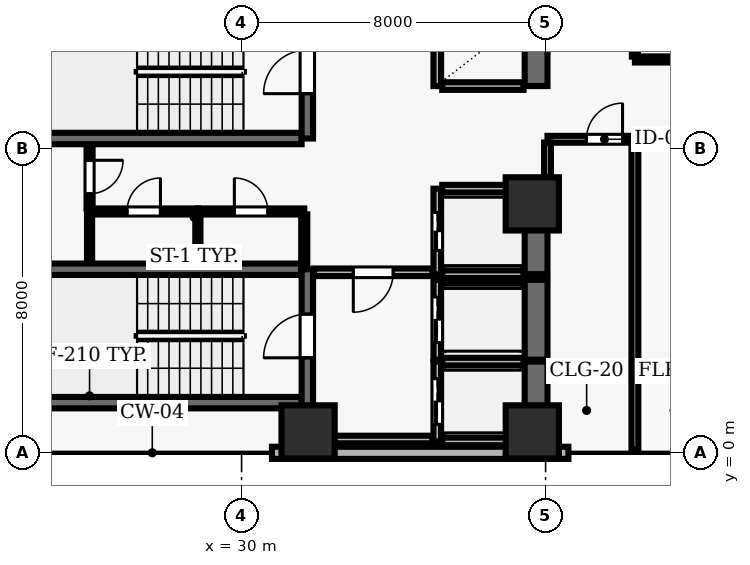
"""IFC4 building model, lengths in metres.
Left out: names, types, materials, properties, quantities, classifications, styles, units other than length and angle.
Written with IfcOpenShell. Run it as: python <this file> out.ifc"""

import sys

from ifc_helpers import new_model, si_unit, direction, frame, frame_2d, origin, origin_2d, place, context, subcontext, project, spatial, rectangle, extrude, element, fill, save


model = new_model("IFC4")
c1 = context("Model", 3, precision=1e-05, world=origin(), true_north=direction((0.0, 1.0)))
c2 = subcontext(c1, "Body", "Model", "MODEL_VIEW")
j1 = project(units=[si_unit("LENGTHUNIT", "METRE"), si_unit("PLANEANGLEUNIT", "RADIAN")], contexts=[c1])
p1 = place(None, origin())
s1 = spatial("IfcSite", under=j1, at=p1, CompositionType="ELEMENT")
p2 = place(p1, origin())
s2 = spatial("IfcBuilding", under=s1, at=p2, CompositionType="ELEMENT")
p3 = place(p2, frame((0.0, 0.0, 54.4)))
s3 = spatial("IfcBuildingStorey", under=s2, at=p3, CompositionType="ELEMENT", Elevation=54.4)
for number, where, z_axis, x_axis in (
    (1, (31.75, 0.55, 0.0), (0.0, 0.0, 1.0), (1.0, 0.0, 0.0)),
    (2, (37.65, 0.55, 0.0), (0.0, 0.0, 1.0), (1.0, 0.0, 0.0)),
    (3, (37.65, 6.55, 0.0), (0.0, 0.0, 1.0), (1.0, 0.0, 0.0)),
):
    element("IfcColumn", number, at=place(p3, frame(where, z_axis=z_axis, x_axis=x_axis)), inside=s3, PredefinedType="COLUMN", context=c2, shape_type="SweptSolid", body=[
        extrude(rectangle(XDim=1.4, YDim=1.4, at=origin_2d()), origin(), (0.0, 0.0, 1.0), 3.9),
    ])
p4 = place(p3, frame((30.8, 0.0, 0.0), z_axis=(0.0, 0.0, 1.0), x_axis=(1.0, 0.0, 0.0)))
e4 = element("IfcWall", 4, at=p4, inside=s3, PredefinedType="SOLIDWALL", context=c2, shape_type="SweptSolid", body=[
    extrude(rectangle(XDim=7.8, YDim=0.32, at=frame_2d((3.9, 0.0))), origin(), (0.0, 0.0, 1.0), 3.69),
])
for number, where, z_axis, x_axis in (
    (5, (31.58, 4.83, 0.0), (0.0, 0.0, 1.0), (-1.0, 0.0, 0.0)),
    (6, (23.22, 1.32, 0.0), (0.0, 0.0, 1.0), (1.0, 0.0, 0.0)),
):
    element("IfcWall", number, at=place(p3, frame(where, z_axis=z_axis, x_axis=x_axis)), inside=s3, PredefinedType="SHEAR", context=c2, shape_type="SweptSolid", body=[
        extrude(rectangle(XDim=8.36, YDim=0.3, at=frame_2d((4.18, 0.0))), origin(), (0.0, 0.0, 1.0), 3.69),
    ])
p5 = place(p3, frame((31.73, 0.96, 0.0), z_axis=(0.0, 0.0, 1.0), x_axis=(0.0, 1.0, 0.0)))
e7 = element("IfcWall", 7, at=p5, inside=s3, PredefinedType="SHEAR", context=c2, shape_type="SweptSolid", body=[
    extrude(rectangle(XDim=3.87, YDim=0.3, at=frame_2d((1.935, 0.0))), origin(), (0.0, 0.0, 1.0), 3.69),
])
p6 = place(p5, frame((1.54, 0.0, 0.0)))
e8 = element("IfcOpeningElement", 8, at=p6, cuts=e7, PredefinedType="OPENING", context=c2, shape_type="SweptSolid", body=[
    extrude(rectangle(XDim=1.15, YDim=2.15, at=frame_2d((0.575, 1.075))), frame((0.0, 0.16, 0.0), z_axis=(0.0, -1.0, 0.0), x_axis=(1.0, 0.0, 0.0)), (0.0, 0.0, 1.0), 0.32),
])
p7 = place(p3, frame((23.22, 8.27, 0.0), z_axis=(0.0, 0.0, 1.0), x_axis=(1.0, 0.0, 0.0)))
e9 = element("IfcWall", 9, at=p7, inside=s3, PredefinedType="SHEAR", context=c2, shape_type="SweptSolid", body=[
    extrude(rectangle(XDim=8.36, YDim=0.3, at=frame_2d((4.18, 0.0))), origin(), (0.0, 0.0, 1.0), 3.69),
])
p8 = place(p3, frame((31.73, 8.27, 0.0), z_axis=(0.0, 0.0, 1.0), x_axis=(0.0, 1.0, 0.0)))
e10 = element("IfcWall", 10, at=p8, inside=s3, PredefinedType="SHEAR", context=c2, shape_type="SweptSolid", body=[
    extrude(rectangle(XDim=3.51, YDim=0.3, at=frame_2d((1.755, 0.0))), origin(), (0.0, 0.0, 1.0), 3.69),
])
p9 = place(p8, frame((1.18, 0.0, 0.0)))
e11 = element("IfcOpeningElement", 11, at=p9, cuts=e10, PredefinedType="OPENING", context=c2, shape_type="SweptSolid", body=[
    extrude(rectangle(XDim=1.15, YDim=2.15, at=frame_2d((0.575, 1.075))), frame((0.0, 0.16, 0.0), z_axis=(0.0, -1.0, 0.0), x_axis=(1.0, 0.0, 0.0)), (0.0, 0.0, 1.0), 0.32),
])
p10 = place(p3, frame((35.15, 2.4, 0.0), z_axis=(0.0, 0.0, 1.0), x_axis=(0.0, -1.0, 0.0)))
e12 = element("IfcWall", 12, at=p10, inside=s3, PredefinedType="SOLIDWALL", context=c2, shape_type="SweptSolid", body=[
    extrude(rectangle(XDim=2.1, YDim=0.2, at=frame_2d((1.05, 0.0))), origin(), (0.0, 0.0, 1.0), 3.69),
])
p11 = place(p10, frame((0.45, 0.0, 0.0)))
e13 = element("IfcOpeningElement", 13, at=p11, cuts=e12, PredefinedType="OPENING", context=c2, shape_type="SweptSolid", body=[
    extrude(rectangle(XDim=1.2, YDim=2.15, at=frame_2d((0.6, 1.075))), frame((0.0, 0.11, 0.0), z_axis=(0.0, -1.0, 0.0), x_axis=(1.0, 0.0, 0.0)), (0.0, 0.0, 1.0), 0.22),
])
p12 = place(p3, frame((37.75, 0.3, 0.0), z_axis=(0.0, 0.0, 1.0), x_axis=(0.0, 1.0, 0.0)))
e14 = element("IfcWall", 14, at=p12, inside=s3, PredefinedType="SHEAR", context=c2, shape_type="SweptSolid", body=[
    extrude(rectangle(XDim=2.1, YDim=0.6, at=frame_2d((1.05, 0.0))), origin(), (0.0, 0.0, 1.0), 3.69),
])
for number, where, z_axis, x_axis in (
    (15, (35.28, 0.3, 0.0), (0.0, 0.0, 1.0), (1.0, 0.0, 0.0)),
    (16, (37.42, 2.4, 0.0), (0.0, 0.0, 1.0), (-1.0, 0.0, 0.0)),
):
    element("IfcWall", number, at=place(p3, frame(where, z_axis=z_axis, x_axis=x_axis)), inside=s3, PredefinedType="SOLIDWALL", context=c2, shape_type="SweptSolid", body=[
        extrude(rectangle(XDim=2.14, YDim=0.2, at=frame_2d((1.07, 0.0))), origin(), (0.0, 0.0, 1.0), 3.69),
    ])
p13 = place(p3, frame((35.15, 4.55, 0.0), z_axis=(0.0, 0.0, 1.0), x_axis=(0.0, -1.0, 0.0)))
e17 = element("IfcWall", 17, at=p13, inside=s3, PredefinedType="SOLIDWALL", context=c2, shape_type="SweptSolid", body=[
    extrude(rectangle(XDim=2.1, YDim=0.2, at=frame_2d((1.05, 0.0))), origin(), (0.0, 0.0, 1.0), 3.69),
])
p14 = place(p13, frame((0.45, 0.0, 0.0)))
e18 = element("IfcOpeningElement", 18, at=p14, cuts=e17, PredefinedType="OPENING", context=c2, shape_type="SweptSolid", body=[
    extrude(rectangle(XDim=1.2, YDim=2.15, at=frame_2d((0.6, 1.075))), frame((0.0, 0.11, 0.0), z_axis=(0.0, -1.0, 0.0), x_axis=(1.0, 0.0, 0.0)), (0.0, 0.0, 1.0), 0.22),
])
p15 = place(p3, frame((37.75, 2.45, 0.0), z_axis=(0.0, 0.0, 1.0), x_axis=(0.0, 1.0, 0.0)))
e19 = element("IfcWall", 19, at=p15, inside=s3, PredefinedType="SHEAR", context=c2, shape_type="SweptSolid", body=[
    extrude(rectangle(XDim=2.1, YDim=0.6, at=frame_2d((1.05, 0.0))), origin(), (0.0, 0.0, 1.0), 3.69),
])
p16 = place(p3, frame((37.42, 4.55, 0.0), z_axis=(0.0, 0.0, 1.0), x_axis=(-1.0, 0.0, 0.0)))
e20 = element("IfcWall", 20, at=p16, inside=s3, PredefinedType="SOLIDWALL", context=c2, shape_type="SweptSolid", body=[
    extrude(rectangle(XDim=2.14, YDim=0.2, at=frame_2d((1.07, 0.0))), origin(), (0.0, 0.0, 1.0), 3.69),
])
p17 = place(p3, frame((35.15, 6.95, 0.0), z_axis=(0.0, 0.0, 1.0), x_axis=(0.0, -1.0, 0.0)))
e21 = element("IfcWall", 21, at=p17, inside=s3, PredefinedType="SOLIDWALL", context=c2, shape_type="SweptSolid", body=[
    extrude(rectangle(XDim=2.25, YDim=0.2, at=frame_2d((1.125, 0.0))), origin(), (0.0, 0.0, 1.0), 3.69),
])
p18 = place(p17, frame((0.625, 0.0, 0.0)))
e22 = element("IfcOpeningElement", 22, at=p18, cuts=e21, PredefinedType="OPENING", context=c2, shape_type="SweptSolid", body=[
    extrude(rectangle(XDim=1.0, YDim=2.1, at=frame_2d((0.5, 1.05))), frame((0.0, 0.11, 0.0), z_axis=(0.0, -1.0, 0.0), x_axis=(1.0, 0.0, 0.0)), (0.0, 0.0, 1.0), 0.22),
])
p19 = place(p3, frame((37.75, 4.7, 0.0), z_axis=(0.0, 0.0, 1.0), x_axis=(0.0, 1.0, 0.0)))
e23 = element("IfcWall", 23, at=p19, inside=s3, PredefinedType="SHEAR", context=c2, shape_type="SweptSolid", body=[
    extrude(rectangle(XDim=2.25, YDim=0.6, at=frame_2d((1.125, 0.0))), origin(), (0.0, 0.0, 1.0), 3.69),
])
for number, where, z_axis, x_axis in (
    (24, (35.28, 4.7, 0.0), (0.0, 0.0, 1.0), (1.0, 0.0, 0.0)),
    (25, (37.42, 6.95, 0.0), (0.0, 0.0, 1.0), (-1.0, 0.0, 0.0)),
):
    element("IfcWall", number, at=place(p3, frame(where, z_axis=z_axis, x_axis=x_axis)), inside=s3, PredefinedType="SOLIDWALL", context=c2, shape_type="SweptSolid", body=[
        extrude(rectangle(XDim=2.14, YDim=0.2, at=frame_2d((1.07, 0.0))), origin(), (0.0, 0.0, 1.0), 3.69),
    ])
p20 = place(p3, frame((35.15, 11.55, 0.0), z_axis=(0.0, 0.0, 1.0), x_axis=(0.0, -1.0, 0.0)))
e26 = element("IfcWall", 26, at=p20, inside=s3, PredefinedType="SOLIDWALL", context=c2, shape_type="SweptSolid", body=[
    extrude(rectangle(XDim=1.9, YDim=0.2, at=frame_2d((0.95, 0.0))), origin(), (0.0, 0.0, 1.0), 3.69),
])
p21 = place(p3, frame((37.75, 9.65, 0.0), z_axis=(0.0, 0.0, 1.0), x_axis=(0.0, 1.0, 0.0)))
e27 = element("IfcWall", 27, at=p21, inside=s3, PredefinedType="SHEAR", context=c2, shape_type="SweptSolid", body=[
    extrude(rectangle(XDim=1.9, YDim=0.6, at=frame_2d((0.95, 0.0))), origin(), (0.0, 0.0, 1.0), 3.69),
])
p22 = place(p3, frame((35.28, 9.65, 0.0), z_axis=(0.0, 0.0, 1.0), x_axis=(1.0, 0.0, 0.0)))
e28 = element("IfcWall", 28, at=p22, inside=s3, PredefinedType="SOLIDWALL", context=c2, shape_type="SweptSolid", body=[
    extrude(rectangle(XDim=2.14, YDim=0.2, at=frame_2d((1.07, 0.0))), origin(), (0.0, 0.0, 1.0), 3.69),
])
p23 = place(p3, frame((26.0, 6.35, 0.0), z_axis=(0.0, 0.0, 1.0), x_axis=(1.0, 0.0, 0.0)))
e29 = element("IfcWall", 29, at=p23, inside=s3, PredefinedType="PARTITIONING", context=c2, shape_type="SweptSolid", body=[
    extrude(rectangle(XDim=2.85, YDim=0.16, at=frame_2d((1.425, 0.0))), origin(), (0.0, 0.0, 1.0), 3.69),
])
p24 = place(p23, frame((0.985, 0.0, 0.0)))
e30 = element("IfcOpeningElement", 30, at=p24, cuts=e29, PredefinedType="OPENING", context=c2, shape_type="SweptSolid", body=[
    extrude(rectangle(XDim=0.88, YDim=2.1, at=frame_2d((0.44, 1.05))), frame((0.0, 0.09, 0.0), z_axis=(0.0, -1.0, 0.0), x_axis=(1.0, 0.0, 0.0)), (0.0, 0.0, 1.0), 0.18),
])
p25 = place(p3, frame((28.85, 6.35, 0.0), z_axis=(0.0, 0.0, 1.0), x_axis=(1.0, 0.0, 0.0)))
e31 = element("IfcWall", 31, at=p25, inside=s3, PredefinedType="PARTITIONING", context=c2, shape_type="SweptSolid", body=[
    extrude(rectangle(XDim=2.8, YDim=0.16, at=frame_2d((1.4, 0.0))), origin(), (0.0, 0.0, 1.0), 3.69),
])
p26 = place(p25, frame((0.96, 0.0, 0.0)))
e32 = element("IfcOpeningElement", 32, at=p26, cuts=e31, PredefinedType="OPENING", context=c2, shape_type="SweptSolid", body=[
    extrude(rectangle(XDim=0.88, YDim=2.1, at=frame_2d((0.44, 1.05))), frame((0.0, 0.09, 0.0), z_axis=(0.0, -1.0, 0.0), x_axis=(1.0, 0.0, 0.0)), (0.0, 0.0, 1.0), 0.18),
])
p27 = place(p3, frame((31.65, 0.35, 0.0), z_axis=(0.0, 0.0, 1.0), x_axis=(1.0, 0.0, 0.0)))
e33 = element("IfcWall", 33, at=p27, inside=s3, PredefinedType="SOLIDWALL", context=c2, shape_type="SweptSolid", body=[
    extrude(rectangle(XDim=3.37, YDim=0.2, at=frame_2d((1.685, 0.0))), origin(), (0.0, 0.0, 1.0), 3.69),
])
p28 = place(p3, frame((35.02, 4.75, 0.0), z_axis=(0.0, 0.0, 1.0), x_axis=(-1.0, 0.0, 0.0)))
e34 = element("IfcWall", 34, at=p28, inside=s3, PredefinedType="SOLIDWALL", context=c2, shape_type="SweptSolid", body=[
    extrude(rectangle(XDim=3.11, YDim=0.2, at=frame_2d((1.555, 0.0))), origin(), (0.0, 0.0, 1.0), 3.69),
])
p29 = place(p28, frame((1.03, 0.0, 0.0)))
e35 = element("IfcOpeningElement", 35, at=p29, cuts=e34, PredefinedType="OPENING", context=c2, shape_type="SweptSolid", body=[
    extrude(rectangle(XDim=1.05, YDim=2.15, at=frame_2d((0.525, 1.075))), frame((0.0, 0.11, 0.0), z_axis=(0.0, -1.0, 0.0), x_axis=(1.0, 0.0, 0.0)), (0.0, 0.0, 1.0), 0.22),
])
p30 = place(p3, frame((38.05, 8.25, 0.0), z_axis=(0.0, 0.0, 1.0), x_axis=(1.0, 0.0, 0.0)))
e36 = element("IfcWall", 36, at=p30, inside=s3, PredefinedType="PARTITIONING", context=c2, shape_type="SweptSolid", body=[
    extrude(rectangle(XDim=2.3, YDim=0.18, at=frame_2d((1.15, 0.0))), origin(), (0.0, 0.0, 1.0), 2.995),
])
p31 = place(p30, frame((1.025, 0.0, 0.0)))
e37 = element("IfcOpeningElement", 37, at=p31, cuts=e36, PredefinedType="OPENING", context=c2, shape_type="SweptSolid", body=[
    extrude(rectangle(XDim=0.95, YDim=2.1, at=frame_2d((0.475, 1.05))), frame((0.0, 0.1, 0.0), z_axis=(0.0, -1.0, 0.0), x_axis=(1.0, 0.0, 0.0)), (0.0, 0.0, 1.0), 0.2),
])
p32 = place(p3, frame((40.35, 8.25, 0.0), z_axis=(0.0, 0.0, 1.0), x_axis=(1.0, 0.0, 0.0)))
e38 = element("IfcWall", 38, at=p32, inside=s3, PredefinedType="PARTITIONING", context=c2, shape_type="SweptSolid", body=[
    extrude(rectangle(XDim=8.91, YDim=0.16, at=frame_2d((4.455, 0.0))), origin(), (0.0, 0.0, 1.0), 2.995),
])
p33 = place(p32, frame((2.955, 0.0, 0.0)))
e39 = element("IfcOpeningElement", 39, at=p33, cuts=e38, PredefinedType="OPENING", context=c2, shape_type="SweptSolid", body=[
    extrude(rectangle(XDim=0.9, YDim=2.1, at=frame_2d((0.45, 1.05))), frame((0.0, 0.09, 0.0), z_axis=(0.0, -1.0, 0.0), x_axis=(1.0, 0.0, 0.0)), (0.0, 0.0, 1.0), 0.18),
])
p34 = place(p3, frame((49.26, 10.35, 0.0), z_axis=(0.0, 0.0, 1.0), x_axis=(-1.0, 0.0, 0.0)))
e40 = element("IfcWall", 40, at=p34, inside=s3, PredefinedType="PARTITIONING", context=c2, shape_type="SweptSolid", body=[
    extrude(rectangle(XDim=8.91, YDim=0.16, at=frame_2d((4.455, 0.0))), origin(), (0.0, 0.0, 1.0), 3.227),
])
p35 = place(p34, frame((4.005, 0.0, 0.0)))
e41 = element("IfcOpeningElement", 41, at=p35, cuts=e40, PredefinedType="OPENING", context=c2, shape_type="SweptSolid", body=[
    extrude(rectangle(XDim=0.9, YDim=2.1, at=frame_2d((0.45, 1.05))), frame((0.0, 0.09, 0.0), z_axis=(0.0, -1.0, 0.0), x_axis=(1.0, 0.0, 0.0)), (0.0, 0.0, 1.0), 0.18),
])
p36 = place(p3, frame((26.0, 5.01, 0.0), z_axis=(0.0, 0.0, 1.0), x_axis=(0.0, 1.0, 0.0)))
e42 = element("IfcWall", 42, at=p36, inside=s3, PredefinedType="PARTITIONING", context=c2, shape_type="SweptSolid", body=[
    extrude(rectangle(XDim=1.265, YDim=0.135, at=frame_2d((0.632, 0.0))), origin(), (0.0, 0.0, 1.0), 3.69),
])
p37 = place(p3, frame((26.0, 8.09, 0.0), z_axis=(0.0, 0.0, 1.0), x_axis=(0.0, -1.0, 0.0)))
e43 = element("IfcWall", 43, at=p37, inside=s3, PredefinedType="PARTITIONING", context=c2, shape_type="SweptSolid", body=[
    extrude(rectangle(XDim=1.665, YDim=0.16, at=frame_2d((0.833, 0.0))), origin(), (0.0, 0.0, 1.0), 3.69),
])
p38 = place(p37, frame((0.393, 0.0, 0.0)))
e44 = element("IfcOpeningElement", 44, at=p38, cuts=e43, PredefinedType="OPENING", context=c2, shape_type="SweptSolid", body=[
    extrude(rectangle(XDim=0.88, YDim=2.1, at=frame_2d((0.44, 1.05))), frame((0.0, 0.09, 0.0), z_axis=(0.0, -1.0, 0.0), x_axis=(1.0, 0.0, 0.0)), (0.0, 0.0, 1.0), 0.18),
])
p39 = place(p3, frame((28.85, 5.01, 0.0), z_axis=(0.0, 0.0, 1.0), x_axis=(0.0, 1.0, 0.0)))
e45 = element("IfcWall", 45, at=p39, inside=s3, PredefinedType="PARTITIONING", context=c2, shape_type="SweptSolid", body=[
    extrude(rectangle(XDim=1.265, YDim=0.135, at=frame_2d((0.632, 0.0))), origin(), (0.0, 0.0, 1.0), 3.69),
])
p40 = place(p3, frame((31.65, 4.86, 0.0), z_axis=(0.0, 0.0, 1.0), x_axis=(0.0, 1.0, 0.0)))
e46 = element("IfcWall", 46, at=p40, inside=s3, PredefinedType="PARTITIONING", context=c2, shape_type="SweptSolid", body=[
    extrude(rectangle(XDim=1.415, YDim=0.16, at=frame_2d((0.708, 0.0))), origin(), (0.0, 0.0, 1.0), 3.69),
])
p41 = place(p3, frame((38.05, 7.05, 0.0), z_axis=(0.0, 0.0, 1.0), x_axis=(0.0, 1.0, 0.0)))
e47 = element("IfcWall", 47, at=p41, inside=s3, PredefinedType="PARTITIONING", context=c2, shape_type="SweptSolid", body=[
    extrude(rectangle(XDim=1.115, YDim=0.18, at=frame_2d((0.558, 0.0))), origin(), (0.0, 0.0, 1.0), 2.995),
])
p42 = place(p3, frame((40.35, 0.09, 0.0), z_axis=(0.0, 0.0, 1.0), x_axis=(0.0, 1.0, 0.0)))
e48 = element("IfcWall", 48, at=p42, inside=s3, PredefinedType="PARTITIONING", context=c2, shape_type="SweptSolid", body=[
    extrude(rectangle(XDim=8.075, YDim=0.18, at=frame_2d((4.038, 0.0))), origin(), (0.0, 0.0, 1.0), 3.69),
])
p43 = place(p3, frame((40.35, 10.425, 0.0), z_axis=(0.0, 0.0, 1.0), x_axis=(0.0, 1.0, 0.0)))
e49 = element("IfcWall", 49, at=p43, inside=s3, PredefinedType="PARTITIONING", context=c2, shape_type="SweptSolid", body=[
    extrude(rectangle(XDim=5.5, YDim=0.16, at=frame_2d((2.75, 0.0))), origin(), (0.0, 0.0, 1.0), 3.227),
])
p44 = place(p6, origin())
e50 = element("IfcDoor", 50, at=p44, inside=s3, OperationType="SINGLE_SWING_LEFT", PredefinedType="DOOR", context=c2, shape_type="SweptSolid", body=[
    extrude(rectangle(XDim=1.15, YDim=2.15, at=frame_2d((0.575, 1.075))), frame((0.0, 0.025, 0.0), z_axis=(0.0, -1.0, 0.0), x_axis=(1.0, 0.0, 0.0)), (0.0, 0.0, 1.0), 0.05),
])
fill(e8, e50)
p45 = place(p9, origin())
e51 = element("IfcDoor", 51, at=p45, inside=s3, OperationType="SINGLE_SWING_LEFT", PredefinedType="DOOR", context=c2, shape_type="SweptSolid", body=[
    extrude(rectangle(XDim=1.15, YDim=2.15, at=frame_2d((0.575, 1.075))), frame((0.0, 0.025, 0.0), z_axis=(0.0, -1.0, 0.0), x_axis=(1.0, 0.0, 0.0)), (0.0, 0.0, 1.0), 0.05),
])
fill(e11, e51)
p46 = place(p11, origin())
e52 = element("IfcDoor", 52, at=p46, inside=s3, OperationType="DOUBLE_DOOR_SLIDING", PredefinedType="DOOR", context=c2, shape_type="SweptSolid", body=[
    extrude(rectangle(XDim=1.2, YDim=2.15, at=frame_2d((0.6, 1.075))), frame((0.0, 0.025, 0.0), z_axis=(0.0, -1.0, 0.0), x_axis=(1.0, 0.0, 0.0)), (0.0, 0.0, 1.0), 0.05),
])
fill(e13, e52)
p47 = place(p14, origin())
e53 = element("IfcDoor", 53, at=p47, inside=s3, OperationType="DOUBLE_DOOR_SLIDING", PredefinedType="DOOR", context=c2, shape_type="SweptSolid", body=[
    extrude(rectangle(XDim=1.2, YDim=2.15, at=frame_2d((0.6, 1.075))), frame((0.0, 0.025, 0.0), z_axis=(0.0, -1.0, 0.0), x_axis=(1.0, 0.0, 0.0)), (0.0, 0.0, 1.0), 0.05),
])
fill(e18, e53)
p48 = place(p18, origin())
e54 = element("IfcDoor", 54, at=p48, inside=s3, OperationType="DOUBLE_DOOR_SLIDING", PredefinedType="DOOR", context=c2, shape_type="SweptSolid", body=[
    extrude(rectangle(XDim=1.0, YDim=2.1, at=frame_2d((0.5, 1.05))), frame((0.0, 0.025, 0.0), z_axis=(0.0, -1.0, 0.0), x_axis=(1.0, 0.0, 0.0)), (0.0, 0.0, 1.0), 0.05),
])
fill(e22, e54)
p49 = place(p29, origin())
e55 = element("IfcDoor", 55, at=p49, inside=s3, OperationType="SINGLE_SWING_RIGHT", PredefinedType="DOOR", context=c2, shape_type="SweptSolid", body=[
    extrude(rectangle(XDim=1.05, YDim=2.15, at=frame_2d((0.525, 1.075))), frame((0.0, 0.025, 0.0), z_axis=(0.0, -1.0, 0.0), x_axis=(1.0, 0.0, 0.0)), (0.0, 0.0, 1.0), 0.05),
])
fill(e35, e55)
p50 = place(p38, origin())
e56 = element("IfcDoor", 56, at=p50, inside=s3, OperationType="SINGLE_SWING_LEFT", PredefinedType="DOOR", context=c2, shape_type="SweptSolid", body=[
    extrude(rectangle(XDim=0.88, YDim=2.1, at=frame_2d((0.44, 1.05))), frame((0.0, 0.025, 0.0), z_axis=(0.0, -1.0, 0.0), x_axis=(1.0, 0.0, 0.0)), (0.0, 0.0, 1.0), 0.05),
])
fill(e44, e56)
p51 = place(p24, origin())
e57 = element("IfcDoor", 57, at=p51, inside=s3, OperationType="SINGLE_SWING_RIGHT", PredefinedType="DOOR", context=c2, shape_type="SweptSolid", body=[
    extrude(rectangle(XDim=0.88, YDim=2.1, at=frame_2d((0.44, 1.05))), frame((0.0, 0.025, 0.0), z_axis=(0.0, -1.0, 0.0), x_axis=(1.0, 0.0, 0.0)), (0.0, 0.0, 1.0), 0.05),
])
fill(e30, e57)
p52 = place(p26, origin())
e58 = element("IfcDoor", 58, at=p52, inside=s3, OperationType="SINGLE_SWING_LEFT", PredefinedType="DOOR", context=c2, shape_type="SweptSolid", body=[
    extrude(rectangle(XDim=0.88, YDim=2.1, at=frame_2d((0.44, 1.05))), frame((0.0, 0.025, 0.0), z_axis=(0.0, -1.0, 0.0), x_axis=(1.0, 0.0, 0.0)), (0.0, 0.0, 1.0), 0.05),
])
fill(e32, e58)
p53 = place(p31, origin())
e59 = element("IfcDoor", 59, at=p53, inside=s3, OperationType="SINGLE_SWING_RIGHT", PredefinedType="DOOR", context=c2, shape_type="SweptSolid", body=[
    extrude(rectangle(XDim=0.95, YDim=2.1, at=frame_2d((0.475, 1.05))), frame((0.0, 0.025, 0.0), z_axis=(0.0, -1.0, 0.0), x_axis=(1.0, 0.0, 0.0)), (0.0, 0.0, 1.0), 0.05),
])
fill(e37, e59)
save(model, sys.argv[1])
